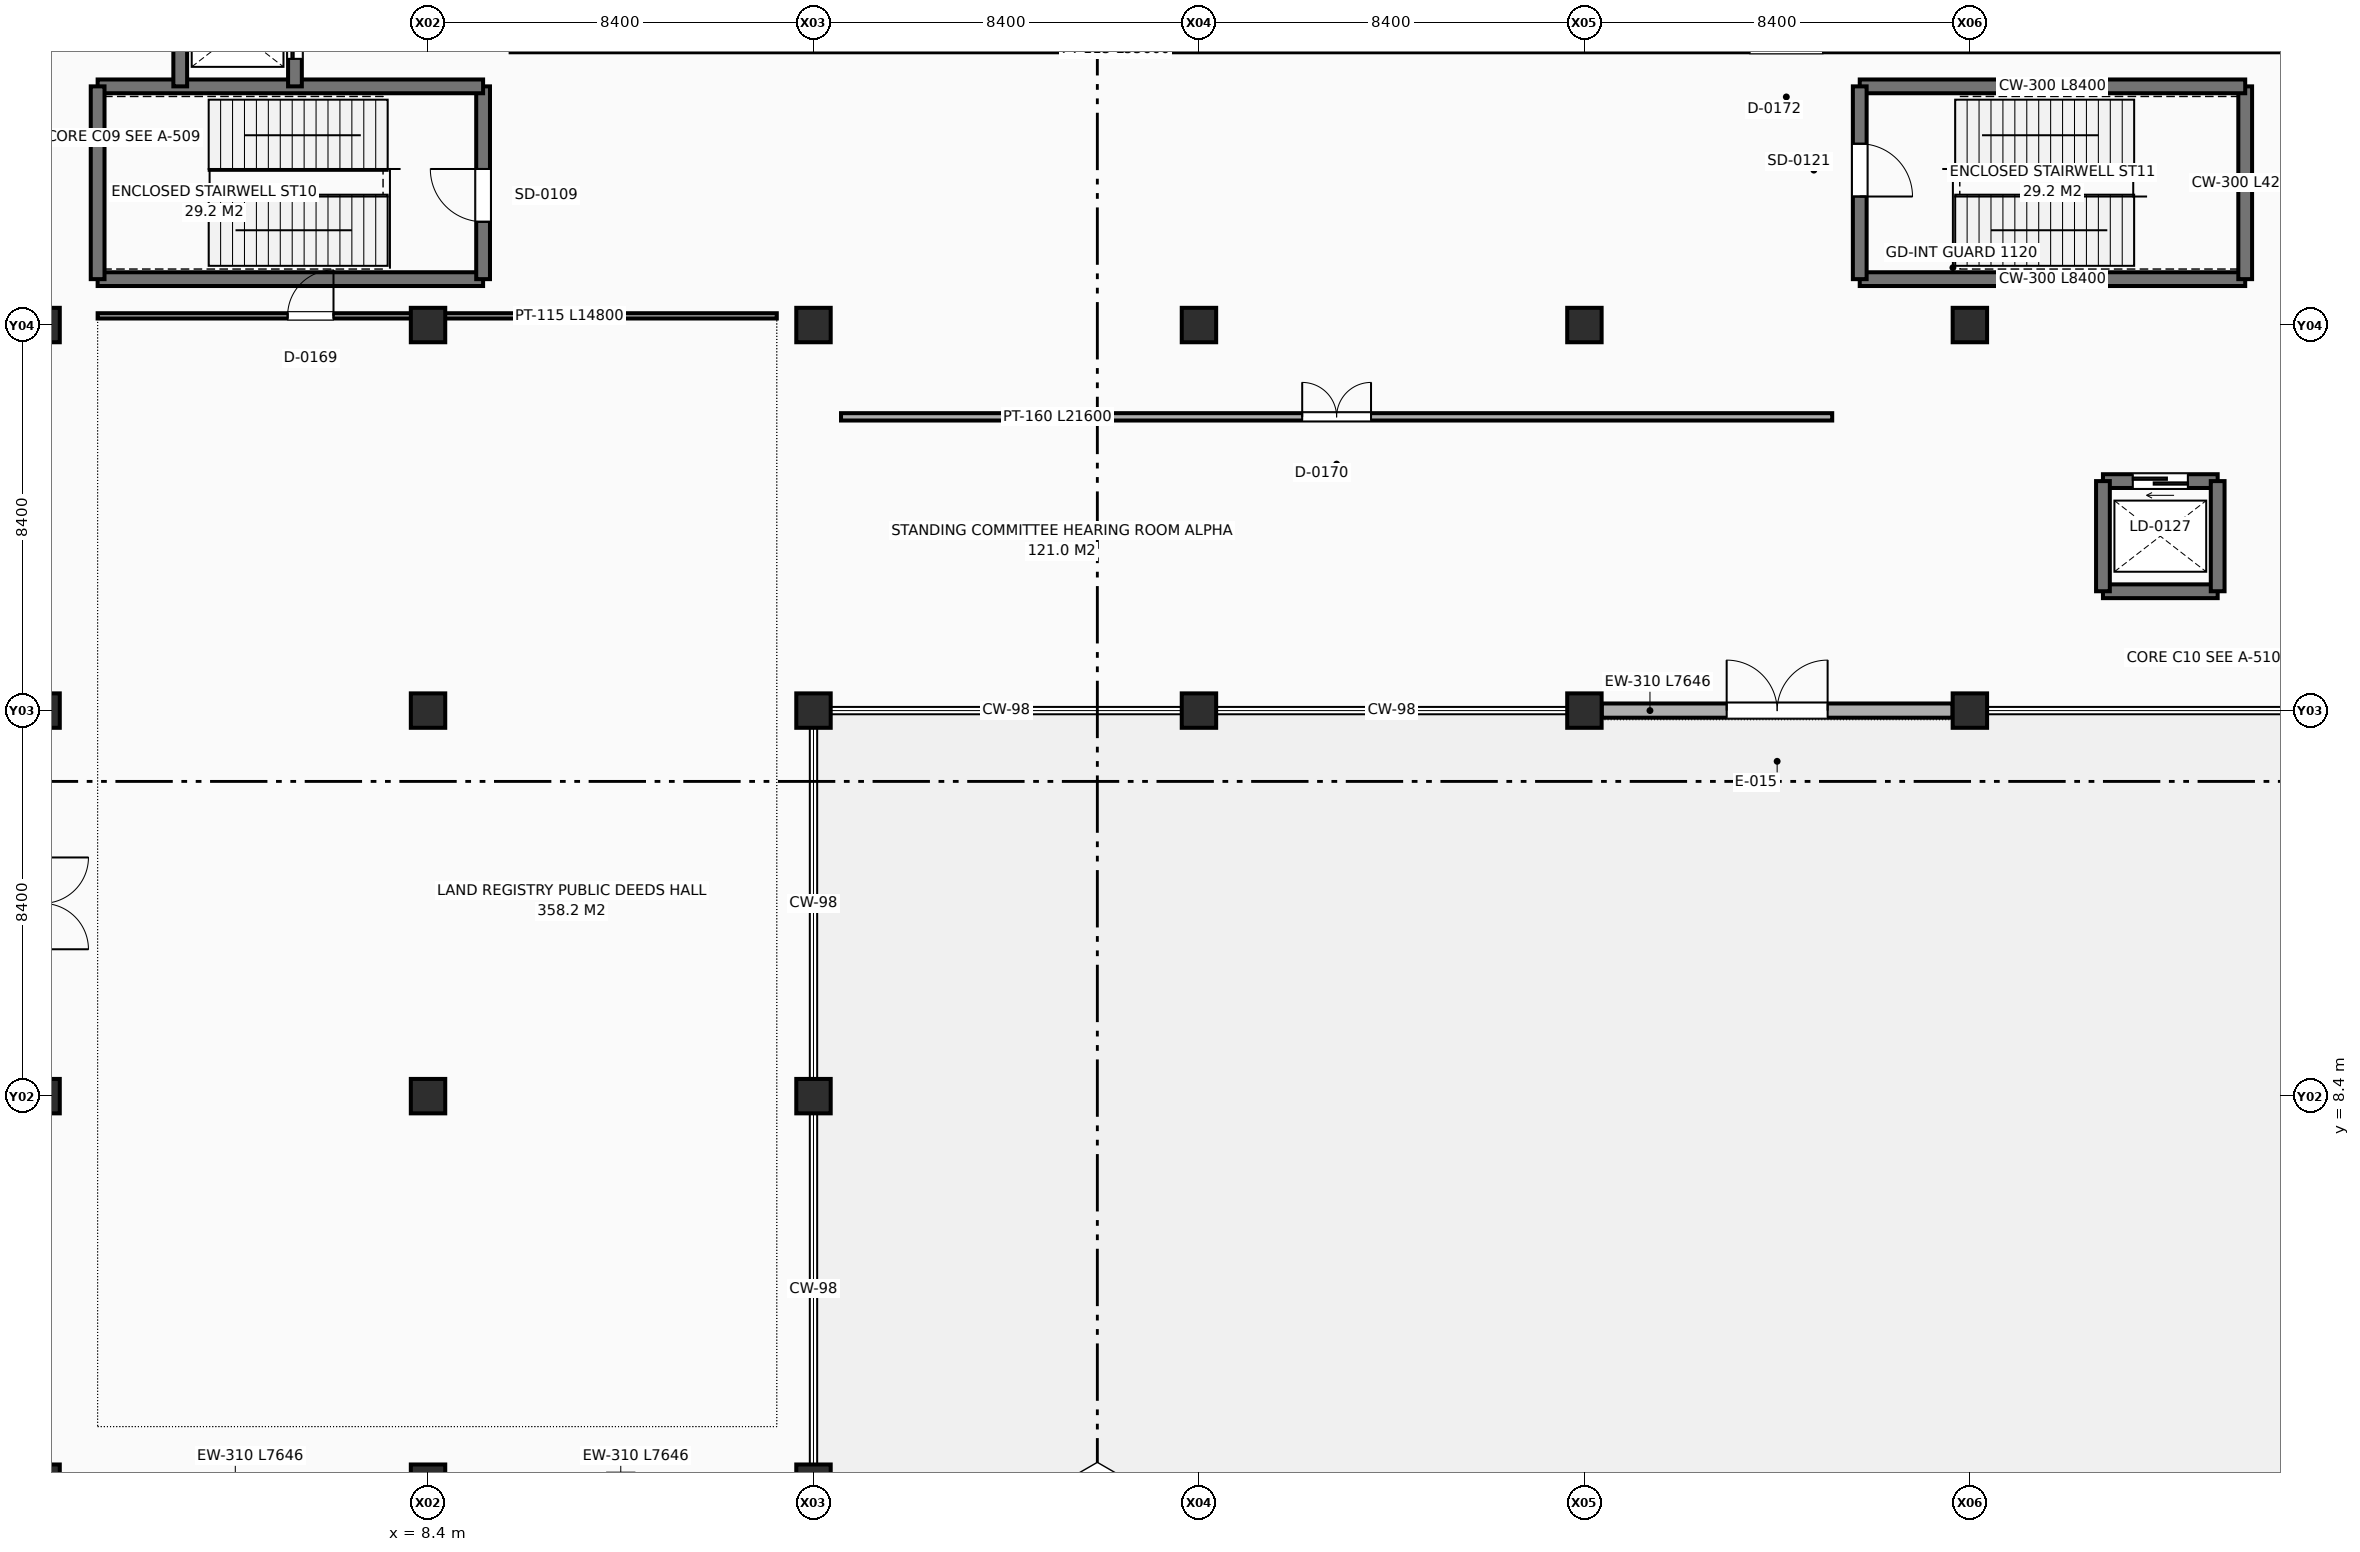
"""IFC4 building model, lengths in metres.
Left out: names, types, materials, properties, quantities, classifications, styles, units other than length and angle.
Written with IfcOpenShell. Run it as: python <this file> out.ifc"""

import sys

from ifc_helpers import new_model, si_unit, direction, frame, frame_2d, origin, origin_2d, place, context, subcontext, project, spatial, rectangle, extrude, element, fill, save


model = new_model("IFC4")
c1 = context("Model", 3, precision=1e-05, world=origin(), true_north=direction((0.0, 1.0)))
c2 = subcontext(c1, "Body", "Model", "MODEL_VIEW")
j1 = project(units=[si_unit("LENGTHUNIT", "METRE"), si_unit("PLANEANGLEUNIT", "RADIAN")], contexts=[c1])
p1 = place(None, origin())
s1 = spatial("IfcSite", under=j1, at=p1, CompositionType="ELEMENT")
p2 = place(p1, origin())
s2 = spatial("IfcBuilding", under=s1, at=p2, CompositionType="ELEMENT")
p3 = place(p2, origin())
s3 = spatial("IfcBuildingStorey", under=s2, at=p3, CompositionType="ELEMENT", Elevation=0.0)
for number, where, z_axis, x_axis in (
    (1, (0.0, 0.0, 0.0), (0.0, 0.0, 1.0), (1.0, 0.0, 0.0)),
    (2, (0.0, 8.4, 0.0), (0.0, 0.0, 1.0), (1.0, 0.0, 0.0)),
    (3, (0.0, 16.8, 0.0), (0.0, 0.0, 1.0), (1.0, 0.0, 0.0)),
    (4, (0.0, 25.2, 0.0), (0.0, 0.0, 1.0), (1.0, 0.0, 0.0)),
    (5, (8.4, 0.0, 0.0), (0.0, 0.0, 1.0), (1.0, 0.0, 0.0)),
    (6, (8.4, 8.4, 0.0), (0.0, 0.0, 1.0), (1.0, 0.0, 0.0)),
    (7, (8.4, 16.8, 0.0), (0.0, 0.0, 1.0), (1.0, 0.0, 0.0)),
    (8, (8.4, 25.2, 0.0), (0.0, 0.0, 1.0), (1.0, 0.0, 0.0)),
    (9, (16.8, 0.0, 0.0), (0.0, 0.0, 1.0), (1.0, 0.0, 0.0)),
    (10, (16.8, 8.4, 0.0), (0.0, 0.0, 1.0), (1.0, 0.0, 0.0)),
    (11, (16.8, 16.8, 0.0), (0.0, 0.0, 1.0), (1.0, 0.0, 0.0)),
    (12, (16.8, 25.2, 0.0), (0.0, 0.0, 1.0), (1.0, 0.0, 0.0)),
    (13, (25.2, 16.8, 0.0), (0.0, 0.0, 1.0), (1.0, 0.0, 0.0)),
    (14, (25.2, 25.2, 0.0), (0.0, 0.0, 1.0), (1.0, 0.0, 0.0)),
    (15, (33.6, 16.8, 0.0), (0.0, 0.0, 1.0), (1.0, 0.0, 0.0)),
    (16, (33.6, 25.2, 0.0), (0.0, 0.0, 1.0), (1.0, 0.0, 0.0)),
    (17, (42.0, 16.8, 0.0), (0.0, 0.0, 1.0), (1.0, 0.0, 0.0)),
    (18, (42.0, 25.2, 0.0), (0.0, 0.0, 1.0), (1.0, 0.0, 0.0)),
):
    element("IfcColumn", number, at=place(p3, frame(where, z_axis=z_axis, x_axis=x_axis)), inside=s3, PredefinedType="COLUMN", context=c2, shape_type="SweptSolid", body=[
        extrude(rectangle(XDim=0.75, YDim=0.75, at=origin_2d()), origin(), (0.0, 0.0, 1.0), 5.4),
    ])
p4 = place(p3, frame((33.977, 16.8, 0.0), z_axis=(0.0, 0.0, 1.0), x_axis=(1.0, 0.0, 0.0)))
e19 = element("IfcWall", 19, at=p4, inside=s3, PredefinedType="SOLIDWALL", context=c2, shape_type="SweptSolid", body=[
    extrude(rectangle(XDim=7.646, YDim=0.31, at=frame_2d((3.823, 0.0))), origin(), (0.0, 0.0, 1.0), 4.49),
])
p5 = place(p4, frame((2.723, 0.0, 0.0)))
e20 = element("IfcOpeningElement", 20, at=p5, cuts=e19, PredefinedType="OPENING", context=c2, shape_type="SweptSolid", body=[
    extrude(rectangle(XDim=2.2, YDim=2.7, at=frame_2d((1.1, 1.35))), frame((0.0, 0.165, 0.0), z_axis=(0.0, -1.0, 0.0), x_axis=(1.0, 0.0, 0.0)), (0.0, 0.0, 1.0), 0.33),
])
p6 = place(p3, frame((1.2, 26.2, 0.0), z_axis=(0.0, 0.0, 1.0), x_axis=(1.0, 0.0, 0.0)))
e21 = element("IfcWall", 21, at=p6, inside=s3, PredefinedType="SHEAR", context=c2, shape_type="SweptSolid", body=[
    extrude(rectangle(XDim=8.4, YDim=0.3, at=frame_2d((4.2, 0.0))), origin(), (0.0, 0.0, 1.0), 5.12),
])
p7 = place(p3, frame((9.6, 26.2, 0.0), z_axis=(0.0, 0.0, 1.0), x_axis=(0.0, 1.0, 0.0)))
e22 = element("IfcWall", 22, at=p7, inside=s3, PredefinedType="SHEAR", context=c2, shape_type="SweptSolid", body=[
    extrude(rectangle(XDim=4.2, YDim=0.3, at=frame_2d((2.1, 0.0))), origin(), (0.0, 0.0, 1.0), 5.12),
])
p8 = place(p7, frame((1.25, 0.0, 0.0)))
e23 = element("IfcOpeningElement", 23, at=p8, cuts=e22, PredefinedType="OPENING", context=c2, shape_type="SweptSolid", body=[
    extrude(rectangle(XDim=1.15, YDim=2.2, at=frame_2d((0.575, 1.1))), frame((0.0, 0.16, 0.0), z_axis=(0.0, -1.0, 0.0), x_axis=(1.0, 0.0, 0.0)), (0.0, 0.0, 1.0), 0.32),
])
p9 = place(p3, frame((9.6, 30.4, 0.0), z_axis=(0.0, 0.0, 1.0), x_axis=(-1.0, 0.0, 0.0)))
e24 = element("IfcWall", 24, at=p9, inside=s3, PredefinedType="SHEAR", context=c2, shape_type="SweptSolid", body=[
    extrude(rectangle(XDim=8.4, YDim=0.3, at=frame_2d((4.2, 0.0))), origin(), (0.0, 0.0, 1.0), 5.12),
])
p10 = place(p3, frame((1.2, 30.4, 0.0), z_axis=(0.0, 0.0, 1.0), x_axis=(0.0, -1.0, 0.0)))
e25 = element("IfcWall", 25, at=p10, inside=s3, PredefinedType="SHEAR", context=c2, shape_type="SweptSolid", body=[
    extrude(rectangle(XDim=4.2, YDim=0.3, at=frame_2d((2.1, 0.0))), origin(), (0.0, 0.0, 1.0), 5.12),
])
p11 = place(p3, frame((3.0, 32.8, 0.0), z_axis=(0.0, 0.0, 1.0), x_axis=(0.0, -1.0, 0.0)))
e26 = element("IfcWall", 26, at=p11, inside=s3, PredefinedType="SHEAR", context=c2, shape_type="SweptSolid", body=[
    extrude(rectangle(XDim=2.4, YDim=0.3, at=frame_2d((1.2, 0.0))), origin(), (0.0, 0.0, 1.0), 5.12),
])
p12 = place(p3, frame((5.5, 30.4, 0.0), z_axis=(0.0, 0.0, 1.0), x_axis=(0.0, 1.0, 0.0)))
e27 = element("IfcWall", 27, at=p12, inside=s3, PredefinedType="SHEAR", context=c2, shape_type="SweptSolid", body=[
    extrude(rectangle(XDim=2.4, YDim=0.3, at=frame_2d((1.2, 0.0))), origin(), (0.0, 0.0, 1.0), 5.12),
])
p13 = place(p12, frame((0.6, 0.0, 0.0)))
e28 = element("IfcOpeningElement", 28, at=p13, cuts=e27, PredefinedType="OPENING", context=c2, shape_type="SweptSolid", body=[
    extrude(rectangle(XDim=1.2, YDim=2.25, at=frame_2d((0.6, 1.125))), frame((0.0, 0.16, 0.0), z_axis=(0.0, -1.0, 0.0), x_axis=(1.0, 0.0, 0.0)), (0.0, 0.0, 1.0), 0.32),
])
p14 = place(p3, frame((39.6, 26.2, 0.0), z_axis=(0.0, 0.0, 1.0), x_axis=(1.0, 0.0, 0.0)))
e29 = element("IfcWall", 29, at=p14, inside=s3, PredefinedType="SHEAR", context=c2, shape_type="SweptSolid", body=[
    extrude(rectangle(XDim=8.4, YDim=0.3, at=frame_2d((4.2, 0.0))), origin(), (0.0, 0.0, 1.0), 5.12),
])
p15 = place(p3, frame((48.0, 26.2, 0.0), z_axis=(0.0, 0.0, 1.0), x_axis=(0.0, 1.0, 0.0)))
e30 = element("IfcWall", 30, at=p15, inside=s3, PredefinedType="SHEAR", context=c2, shape_type="SweptSolid", body=[
    extrude(rectangle(XDim=4.2, YDim=0.3, at=frame_2d((2.1, 0.0))), origin(), (0.0, 0.0, 1.0), 5.12),
])
p16 = place(p3, frame((48.0, 30.4, 0.0), z_axis=(0.0, 0.0, 1.0), x_axis=(-1.0, 0.0, 0.0)))
e31 = element("IfcWall", 31, at=p16, inside=s3, PredefinedType="SHEAR", context=c2, shape_type="SweptSolid", body=[
    extrude(rectangle(XDim=8.4, YDim=0.3, at=frame_2d((4.2, 0.0))), origin(), (0.0, 0.0, 1.0), 5.12),
])
p17 = place(p3, frame((39.6, 30.4, 0.0), z_axis=(0.0, 0.0, 1.0), x_axis=(0.0, -1.0, 0.0)))
e32 = element("IfcWall", 32, at=p17, inside=s3, PredefinedType="SHEAR", context=c2, shape_type="SweptSolid", body=[
    extrude(rectangle(XDim=4.2, YDim=0.3, at=frame_2d((2.1, 0.0))), origin(), (0.0, 0.0, 1.0), 5.12),
])
p18 = place(p17, frame((1.25, 0.0, 0.0)))
e33 = element("IfcOpeningElement", 33, at=p18, cuts=e32, PredefinedType="OPENING", context=c2, shape_type="SweptSolid", body=[
    extrude(rectangle(XDim=1.15, YDim=2.2, at=frame_2d((0.575, 1.1))), frame((0.0, 0.16, 0.0), z_axis=(0.0, -1.0, 0.0), x_axis=(1.0, 0.0, 0.0)), (0.0, 0.0, 1.0), 0.32),
])
p19 = place(p3, frame((47.4, 21.8, 0.0), z_axis=(0.0, 0.0, 1.0), x_axis=(-1.0, 0.0, 0.0)))
e34 = element("IfcWall", 34, at=p19, inside=s3, PredefinedType="SHEAR", context=c2, shape_type="SweptSolid", body=[
    extrude(rectangle(XDim=2.5, YDim=0.3, at=frame_2d((1.25, 0.0))), origin(), (0.0, 0.0, 1.0), 5.12),
])
p20 = place(p19, frame((0.65, 0.0, 0.0)))
e35 = element("IfcOpeningElement", 35, at=p20, cuts=e34, PredefinedType="OPENING", context=c2, shape_type="SweptSolid", body=[
    extrude(rectangle(XDim=1.2, YDim=2.25, at=frame_2d((0.6, 1.125))), frame((0.0, 0.16, 0.0), z_axis=(0.0, -1.0, 0.0), x_axis=(1.0, 0.0, 0.0)), (0.0, 0.0, 1.0), 0.32),
])
p21 = place(p3, frame((44.9, 19.4, 0.0), z_axis=(0.0, 0.0, 1.0), x_axis=(1.0, 0.0, 0.0)))
e36 = element("IfcWall", 36, at=p21, inside=s3, PredefinedType="SHEAR", context=c2, shape_type="SweptSolid", body=[
    extrude(rectangle(XDim=2.5, YDim=0.3, at=frame_2d((1.25, 0.0))), origin(), (0.0, 0.0, 1.0), 5.12),
])
for number, where, z_axis, x_axis in (
    (37, (44.9, 21.8, 0.0), (0.0, 0.0, 1.0), (0.0, -1.0, 0.0)),
    (38, (47.4, 19.4, 0.0), (0.0, 0.0, 1.0), (0.0, 1.0, 0.0)),
):
    element("IfcWall", number, at=place(p3, frame(where, z_axis=z_axis, x_axis=x_axis)), inside=s3, PredefinedType="SHEAR", context=c2, shape_type="SweptSolid", body=[
        extrude(rectangle(XDim=2.4, YDim=0.3, at=frame_2d((1.2, 0.0))), origin(), (0.0, 0.0, 1.0), 5.12),
    ])
p22 = place(p3, frame((1.2, 25.4, 0.0), z_axis=(0.0, 0.0, 1.0), x_axis=(1.0, 0.0, 0.0)))
e39 = element("IfcWall", 39, at=p22, inside=s3, PredefinedType="PARTITIONING", context=c2, shape_type="SweptSolid", body=[
    extrude(rectangle(XDim=14.8, YDim=0.115, at=frame_2d((7.4, 0.0))), origin(), (0.0, 0.0, 1.0), 4.49),
])
p23 = place(p22, frame((4.14, 0.0, 0.0)))
e40 = element("IfcOpeningElement", 40, at=p23, cuts=e39, PredefinedType="OPENING", context=c2, shape_type="SweptSolid", body=[
    extrude(rectangle(XDim=1.0, YDim=2.1, at=frame_2d((0.5, 1.05))), frame((0.0, 0.067, 0.0), z_axis=(0.0, -1.0, 0.0), x_axis=(1.0, 0.0, 0.0)), (0.0, 0.0, 1.0), 0.135),
])
p24 = place(p3, frame((17.4, 23.2, 0.0), z_axis=(0.0, 0.0, 1.0), x_axis=(1.0, 0.0, 0.0)))
e41 = element("IfcWall", 41, at=p24, inside=s3, PredefinedType="PARTITIONING", context=c2, shape_type="SweptSolid", body=[
    extrude(rectangle(XDim=21.6, YDim=0.16, at=frame_2d((10.8, 0.0))), origin(), (0.0, 0.0, 1.0), 5.06),
])
p25 = place(p24, frame((10.05, 0.0, 0.0)))
e42 = element("IfcOpeningElement", 42, at=p25, cuts=e41, PredefinedType="OPENING", context=c2, shape_type="SweptSolid", body=[
    extrude(rectangle(XDim=1.5, YDim=2.35, at=frame_2d((0.75, 1.175))), frame((0.0, 0.09, 0.0), z_axis=(0.0, -1.0, 0.0), x_axis=(1.0, 0.0, 0.0)), (0.0, 0.0, 1.0), 0.18),
])
p26 = place(p3, frame((10.2, 31.2, 0.0), z_axis=(0.0, 0.0, 1.0), x_axis=(1.0, 0.0, 0.0)))
e43 = element("IfcWall", 43, at=p26, inside=s3, PredefinedType="PARTITIONING", context=c2, shape_type="SweptSolid", body=[
    extrude(rectangle(XDim=55.6, YDim=0.115, at=frame_2d((27.8, 0.0))), origin(), (0.0, 0.0, 1.0), 5.06),
])
p27 = place(p26, frame((27.0, 0.0, 0.0)))
e44 = element("IfcOpeningElement", 44, at=p27, cuts=e43, PredefinedType="OPENING", context=c2, shape_type="SweptSolid", body=[
    extrude(rectangle(XDim=1.6, YDim=2.3, at=frame_2d((0.8, 1.15))), frame((0.0, 0.067, 0.0), z_axis=(0.0, -1.0, 0.0), x_axis=(1.0, 0.0, 0.0)), (0.0, 0.0, 1.0), 0.135),
])
p28 = place(p5, frame((2.2, 0.0, 0.0), z_axis=(0.0, 0.0, 1.0), x_axis=(-1.0, 0.0, 0.0)))
e45 = element("IfcDoor", 45, at=p28, inside=s3, OperationType="DOUBLE_DOOR_SINGLE_SWING", PredefinedType="DOOR", context=c2, shape_type="SweptSolid", body=[
    extrude(rectangle(XDim=2.2, YDim=2.7, at=frame_2d((1.1, 1.35))), frame((0.0, 0.025, 0.0), z_axis=(0.0, -1.0, 0.0), x_axis=(1.0, 0.0, 0.0)), (0.0, 0.0, 1.0), 0.05),
])
fill(e20, e45)
p29 = place(p8, frame((1.15, 0.0, 0.0), z_axis=(0.0, 0.0, 1.0), x_axis=(-1.0, 0.0, 0.0)))
e46 = element("IfcDoor", 46, at=p29, inside=s3, OperationType="SINGLE_SWING_RIGHT", PredefinedType="DOOR", context=c2, shape_type="SweptSolid", body=[
    extrude(rectangle(XDim=1.15, YDim=2.2, at=frame_2d((0.575, 1.1))), frame((0.0, 0.025, 0.0), z_axis=(0.0, -1.0, 0.0), x_axis=(1.0, 0.0, 0.0)), (0.0, 0.0, 1.0), 0.05),
])
fill(e23, e46)
p30 = place(p13, origin())
e47 = element("IfcDoor", 47, at=p30, inside=s3, OperationType="SLIDING_TO_LEFT", PredefinedType="DOOR", context=c2, shape_type="SweptSolid", body=[
    extrude(rectangle(XDim=1.2, YDim=2.25, at=frame_2d((0.6, 1.125))), frame((0.0, 0.025, 0.0), z_axis=(0.0, -1.0, 0.0), x_axis=(1.0, 0.0, 0.0)), (0.0, 0.0, 1.0), 0.05),
])
fill(e28, e47)
p31 = place(p18, frame((1.15, 0.0, 0.0), z_axis=(0.0, 0.0, 1.0), x_axis=(-1.0, 0.0, 0.0)))
e48 = element("IfcDoor", 48, at=p31, inside=s3, OperationType="SINGLE_SWING_RIGHT", PredefinedType="DOOR", context=c2, shape_type="SweptSolid", body=[
    extrude(rectangle(XDim=1.15, YDim=2.2, at=frame_2d((0.575, 1.1))), frame((0.0, 0.025, 0.0), z_axis=(0.0, -1.0, 0.0), x_axis=(1.0, 0.0, 0.0)), (0.0, 0.0, 1.0), 0.05),
])
fill(e33, e48)
p32 = place(p20, origin())
e49 = element("IfcDoor", 49, at=p32, inside=s3, OperationType="SLIDING_TO_LEFT", PredefinedType="DOOR", context=c2, shape_type="SweptSolid", body=[
    extrude(rectangle(XDim=1.2, YDim=2.25, at=frame_2d((0.6, 1.125))), frame((0.0, 0.025, 0.0), z_axis=(0.0, -1.0, 0.0), x_axis=(1.0, 0.0, 0.0)), (0.0, 0.0, 1.0), 0.05),
])
fill(e35, e49)
p33 = place(p23, origin())
e50 = element("IfcDoor", 50, at=p33, inside=s3, OperationType="SINGLE_SWING_RIGHT", PredefinedType="DOOR", context=c2, shape_type="SweptSolid", body=[
    extrude(rectangle(XDim=1.0, YDim=2.1, at=frame_2d((0.5, 1.05))), frame((0.0, 0.025, 0.0), z_axis=(0.0, -1.0, 0.0), x_axis=(1.0, 0.0, 0.0)), (0.0, 0.0, 1.0), 0.05),
])
fill(e40, e50)
p34 = place(p25, origin())
e51 = element("IfcDoor", 51, at=p34, inside=s3, OperationType="DOUBLE_DOOR_SINGLE_SWING", PredefinedType="DOOR", context=c2, shape_type="SweptSolid", body=[
    extrude(rectangle(XDim=1.5, YDim=2.35, at=frame_2d((0.75, 1.175))), frame((0.0, 0.025, 0.0), z_axis=(0.0, -1.0, 0.0), x_axis=(1.0, 0.0, 0.0)), (0.0, 0.0, 1.0), 0.05),
])
fill(e42, e51)
save(model, sys.argv[1])
